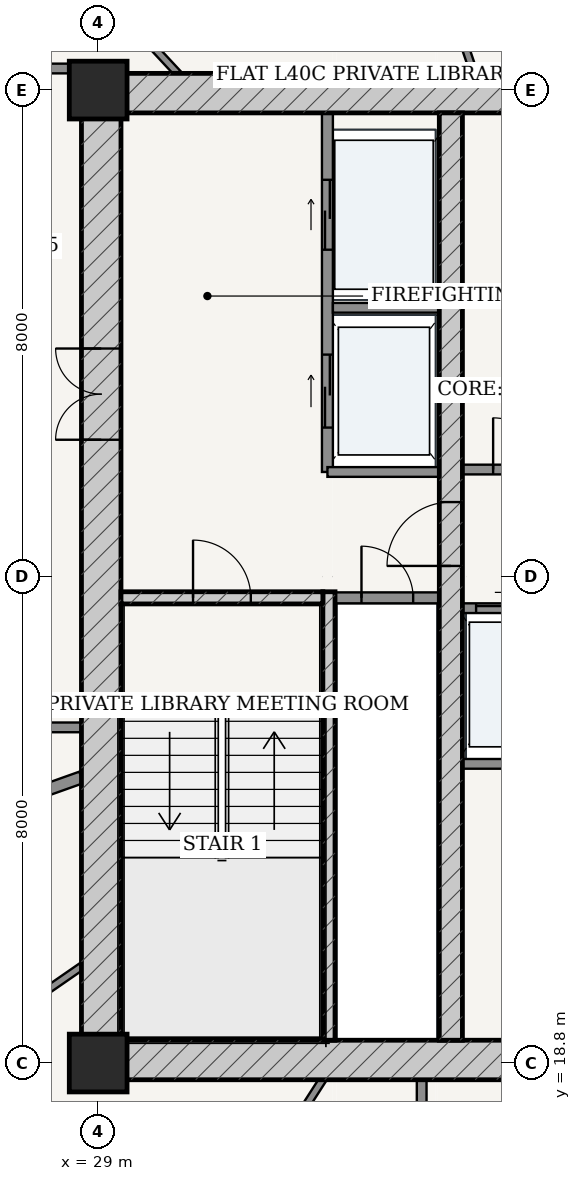
"""IFC4 building model, lengths in metres.
Left out: names, types, materials, properties, quantities, classifications, styles, units other than length and angle.
Written with IfcOpenShell. Run it as: python <this file> out.ifc"""

import sys

from ifc_helpers import new_model, si_unit, direction, frame, frame_2d, origin, origin_2d, place, context, subcontext, project, spatial, rectangle, extrude, source, transform, mapped, element, fill, save


model = new_model("IFC4")
c1 = context("Model", 3, precision=1e-05, world=origin(), true_north=direction((-0.2419218956, 0.970295726276)))
c2 = subcontext(c1, "Body", "Model", "MODEL_VIEW")
j1 = project(units=[si_unit("LENGTHUNIT", "METRE"), si_unit("PLANEANGLEUNIT", "RADIAN")], contexts=[c1])
p1 = place(None, origin())
s1 = spatial("IfcSite", under=j1, at=p1, CompositionType="ELEMENT")
p2 = place(p1, origin())
s2 = spatial("IfcBuilding", under=s1, at=p2, CompositionType="ELEMENT")
p3 = place(p2, frame((0.0, 0.0, 153.4)))
s3 = spatial("IfcBuildingStorey", under=s2, at=p3, CompositionType="ELEMENT", Elevation=153.4)
for number, where, z_axis, x_axis in (
    (1, (29.0, 18.8, 0.0), (0.0, 0.0, 1.0), (1.0, 0.0, 0.0)),
    (2, (29.0, 34.8, 0.0), (0.0, 0.0, 1.0), (1.0, 0.0, 0.0)),
):
    element("IfcColumn", number, at=place(p3, frame(where, z_axis=z_axis, x_axis=x_axis)), inside=s3, PredefinedType="COLUMN", context=c2, shape_type="SweptSolid", body=[
        extrude(rectangle(XDim=0.95, YDim=0.95, at=origin_2d()), origin(), (0.0, 0.0, 1.0), 3.6),
    ])
p4 = place(p3, frame((28.725, 18.85, 0.0), z_axis=(0.0, 0.0, 1.0), x_axis=(1.0, 0.0, 0.0)))
e3 = element("IfcWall", 3, at=p4, inside=s3, PredefinedType="SHEAR", context=c2, shape_type="SweptSolid", body=[
    extrude(rectangle(XDim=18.55, YDim=0.65, at=frame_2d((9.275, 0.0))), origin(), (0.0, 0.0, 1.0), 3.33),
])
p5 = place(p4, frame((7.51, 0.0, 0.0)))
e4 = element("IfcOpeningElement", 4, at=p5, cuts=e3, PredefinedType="OPENING", context=c2, shape_type="SweptSolid", body=[
    extrude(rectangle(XDim=0.85, YDim=2.1, at=frame_2d((0.425, 1.05))), frame((0.0, 0.335, 0.0), z_axis=(0.0, -1.0, 0.0), x_axis=(1.0, 0.0, 0.0)), (0.0, 0.0, 1.0), 0.67),
])
p6 = place(p4, frame((10.59, 0.0, 0.0)))
e5 = element("IfcOpeningElement", 5, at=p6, cuts=e3, PredefinedType="OPENING", context=c2, shape_type="SweptSolid", body=[
    extrude(rectangle(XDim=0.85, YDim=2.1, at=frame_2d((0.425, 1.05))), frame((0.0, 0.335, 0.0), z_axis=(0.0, -1.0, 0.0), x_axis=(1.0, 0.0, 0.0)), (0.0, 0.0, 1.0), 0.67),
])
p7 = place(p3, frame((28.725, 34.75, 0.0), z_axis=(0.0, 0.0, 1.0), x_axis=(1.0, 0.0, 0.0)))
e6 = element("IfcWall", 6, at=p7, inside=s3, PredefinedType="SHEAR", context=c2, shape_type="SweptSolid", body=[
    extrude(rectangle(XDim=18.55, YDim=0.65, at=frame_2d((9.275, 0.0))), origin(), (0.0, 0.0, 1.0), 3.33),
])
p8 = place(p3, frame((29.05, 19.175, 0.0), z_axis=(0.0, 0.0, 1.0), x_axis=(0.0, 1.0, 0.0)))
e7 = element("IfcWall", 7, at=p8, inside=s3, PredefinedType="SHEAR", context=c2, shape_type="SweptSolid", body=[
    extrude(rectangle(XDim=15.25, YDim=0.65, at=frame_2d((7.625, 0.0))), origin(), (0.0, 0.0, 1.0), 3.33),
])
p9 = place(p8, frame((9.875, 0.0, 0.0)))
e8 = element("IfcOpeningElement", 8, at=p9, cuts=e7, PredefinedType="OPENING", context=c2, shape_type="SweptSolid", body=[
    extrude(rectangle(XDim=1.5, YDim=2.2, at=frame_2d((0.75, 1.1))), frame((0.0, 0.335, 0.0), z_axis=(0.0, -1.0, 0.0), x_axis=(1.0, 0.0, 0.0)), (0.0, 0.0, 1.0), 0.67),
])
p10 = place(p3, frame((32.795, 19.175, 0.0), z_axis=(0.0, 0.0, 1.0), x_axis=(0.0, 1.0, 0.0)))
e9 = element("IfcWall", 9, at=p10, inside=s3, PredefinedType="SOLIDWALL", context=c2, shape_type="SweptSolid", body=[
    extrude(rectangle(XDim=7.375, YDim=0.2, at=frame_2d((3.688, 0.0))), origin(), (0.0, 0.0, 1.0), 3.33),
])
p11 = place(p3, frame((29.375, 26.45, 0.0), z_axis=(0.0, 0.0, 1.0), x_axis=(1.0, 0.0, 0.0)))
e10 = element("IfcWall", 10, at=p11, inside=s3, PredefinedType="SOLIDWALL", context=c2, shape_type="SweptSolid", body=[
    extrude(rectangle(XDim=3.32, YDim=0.2, at=frame_2d((1.66, 0.0))), origin(), (0.0, 0.0, 1.0), 3.33),
])
p12 = place(p11, frame((1.185, 0.0, 0.0)))
e11 = element("IfcOpeningElement", 11, at=p12, cuts=e10, PredefinedType="OPENING", context=c2, shape_type="SweptSolid", body=[
    extrude(rectangle(XDim=0.95, YDim=2.15, at=frame_2d((0.475, 1.075))), frame((0.0, 0.11, 0.0), z_axis=(0.0, -1.0, 0.0), x_axis=(1.0, 0.0, 0.0)), (0.0, 0.0, 1.0), 0.22),
])
p13 = place(p3, frame((34.8, 19.175, 0.0), z_axis=(0.0, 0.0, 1.0), x_axis=(0.0, 1.0, 0.0)))
e12 = element("IfcWall", 12, at=p13, inside=s3, PredefinedType="SHEAR", context=c2, shape_type="SweptSolid", body=[
    extrude(rectangle(XDim=15.25, YDim=0.38, at=frame_2d((7.625, 0.0))), origin(), (0.0, 0.0, 1.0), 3.33),
])
p14 = place(p13, frame((7.8, 0.0, 0.0)))
e13 = element("IfcOpeningElement", 13, at=p14, cuts=e12, PredefinedType="OPENING", context=c2, shape_type="SweptSolid", body=[
    extrude(rectangle(XDim=1.05, YDim=2.15, at=frame_2d((0.525, 1.075))), frame((0.0, 0.2, 0.0), z_axis=(0.0, -1.0, 0.0), x_axis=(1.0, 0.0, 0.0)), (0.0, 0.0, 1.0), 0.4),
])
p15 = place(p3, frame((32.9, 26.45, 0.0), z_axis=(0.0, 0.0, 1.0), x_axis=(1.0, 0.0, 0.0)))
e14 = element("IfcWall", 14, at=p15, inside=s3, PredefinedType="PARTITIONING", context=c2, shape_type="SweptSolid", body=[
    extrude(rectangle(XDim=1.71, YDim=0.18, at=frame_2d((0.855, 0.0))), origin(), (0.0, 0.0, 1.0), 3.33),
])
p16 = place(p15, frame((0.43, 0.0, 0.0)))
e15 = element("IfcOpeningElement", 15, at=p16, cuts=e14, PredefinedType="OPENING", context=c2, shape_type="SweptSolid", body=[
    extrude(rectangle(XDim=0.85, YDim=2.1, at=frame_2d((0.425, 1.05))), frame((0.0, 0.1, 0.0), z_axis=(0.0, -1.0, 0.0), x_axis=(1.0, 0.0, 0.0)), (0.0, 0.0, 1.0), 0.2),
])
p17 = place(p3, frame((32.77, 28.52, 0.0), z_axis=(0.0, 0.0, 1.0), x_axis=(0.0, 1.0, 0.0)))
e16 = element("IfcWall", 16, at=p17, inside=s3, PredefinedType="PARTITIONING", context=c2, shape_type="SweptSolid", body=[
    extrude(rectangle(XDim=5.905, YDim=0.18, at=frame_2d((2.953, 0.0))), origin(), (0.0, 0.0, 1.0), 3.33),
])
p18 = place(p17, frame((3.655, 0.0, 0.0)))
e17 = element("IfcOpeningElement", 17, at=p18, cuts=e16, PredefinedType="OPENING", context=c2, shape_type="SweptSolid", body=[
    extrude(rectangle(XDim=1.15, YDim=2.2, at=frame_2d((0.575, 1.1))), frame((0.0, 0.1, 0.0), z_axis=(0.0, -1.0, 0.0), x_axis=(1.0, 0.0, 0.0)), (0.0, 0.0, 1.0), 0.2),
])
p19 = place(p17, frame((0.73, 0.0, 0.0)))
e18 = element("IfcOpeningElement", 18, at=p19, cuts=e16, PredefinedType="OPENING", context=c2, shape_type="SweptSolid", body=[
    extrude(rectangle(XDim=1.2, YDim=2.25, at=frame_2d((0.6, 1.125))), frame((0.0, 0.1, 0.0), z_axis=(0.0, -1.0, 0.0), x_axis=(1.0, 0.0, 0.0)), (0.0, 0.0, 1.0), 0.2),
])
p20 = place(p3, frame((32.86, 31.22, 0.0), z_axis=(0.0, 0.0, 1.0), x_axis=(1.0, 0.0, 0.0)))
e19 = element("IfcWall", 19, at=p20, inside=s3, PredefinedType="PARTITIONING", context=c2, shape_type="SweptSolid", body=[
    extrude(rectangle(XDim=1.75, YDim=0.16, at=frame_2d((0.875, 0.0))), origin(), (0.0, 0.0, 1.0), 3.33),
])
p21 = place(p3, frame((32.77, 28.52, 0.0), z_axis=(0.0, 0.0, 1.0), x_axis=(1.0, 0.0, 0.0)))
e20 = element("IfcWall", 20, at=p21, inside=s3, PredefinedType="PARTITIONING", context=c2, shape_type="SweptSolid", body=[
    extrude(rectangle(XDim=1.84, YDim=0.16, at=frame_2d((0.92, 0.0))), origin(), (0.0, 0.0, 1.0), 3.33),
])
p22 = place(p3, frame((34.99, 28.56, 0.0), z_axis=(0.0, 0.0, 1.0), x_axis=(1.0, 0.0, 0.0)))
e21 = element("IfcWall", 21, at=p22, inside=s3, PredefinedType="PARTITIONING", context=c2, shape_type="SweptSolid", body=[
    extrude(rectangle(XDim=6.02, YDim=0.16, at=frame_2d((3.01, 0.0))), origin(), (0.0, 0.0, 1.0), 3.33),
])
p23 = place(p22, frame((0.505, 0.0, 0.0)))
e22 = element("IfcOpeningElement", 22, at=p23, cuts=e21, PredefinedType="OPENING", context=c2, shape_type="SweptSolid", body=[
    extrude(rectangle(XDim=0.85, YDim=2.1, at=frame_2d((0.425, 1.05))), frame((0.0, 0.09, 0.0), z_axis=(0.0, -1.0, 0.0), x_axis=(1.0, 0.0, 0.0)), (0.0, 0.0, 1.0), 0.18),
])
p24 = place(p22, frame((2.58, 0.0, 0.0)))
e23 = element("IfcOpeningElement", 23, at=p24, cuts=e21, PredefinedType="OPENING", context=c2, shape_type="SweptSolid", body=[
    extrude(rectangle(XDim=0.86, YDim=2.1, at=frame_2d((0.43, 1.05))), frame((0.0, 0.09, 0.0), z_axis=(0.0, -1.0, 0.0), x_axis=(1.0, 0.0, 0.0)), (0.0, 0.0, 1.0), 0.18),
])
p25 = place(p22, frame((4.665, 0.0, 0.0)))
e24 = element("IfcOpeningElement", 24, at=p25, cuts=e21, PredefinedType="OPENING", context=c2, shape_type="SweptSolid", body=[
    extrude(rectangle(XDim=0.85, YDim=2.1, at=frame_2d((0.425, 1.05))), frame((0.0, 0.09, 0.0), z_axis=(0.0, -1.0, 0.0), x_axis=(1.0, 0.0, 0.0)), (0.0, 0.0, 1.0), 0.18),
])
p26 = place(p3, frame((34.99, 26.28, 0.0), z_axis=(0.0, 0.0, 1.0), x_axis=(1.0, 0.0, 0.0)))
e25 = element("IfcWall", 25, at=p26, inside=s3, PredefinedType="PARTITIONING", context=c2, shape_type="SweptSolid", body=[
    extrude(rectangle(XDim=6.02, YDim=0.16, at=frame_2d((3.01, 0.0))), origin(), (0.0, 0.0, 1.0), 3.33),
])
p27 = place(p26, frame((0.225, 0.0, 0.0)))
e26 = element("IfcOpeningElement", 26, at=p27, cuts=e25, PredefinedType="OPENING", context=c2, shape_type="SweptSolid", body=[
    extrude(rectangle(XDim=1.1, YDim=2.2, at=frame_2d((0.55, 1.1))), frame((0.0, 0.09, 0.0), z_axis=(0.0, -1.0, 0.0), x_axis=(1.0, 0.0, 0.0)), (0.0, 0.0, 1.0), 0.18),
])
p28 = place(p26, frame((1.705, 0.0, 0.0)))
e27 = element("IfcOpeningElement", 27, at=p28, cuts=e25, PredefinedType="OPENING", context=c2, shape_type="SweptSolid", body=[
    extrude(rectangle(XDim=1.1, YDim=2.2, at=frame_2d((0.55, 1.1))), frame((0.0, 0.09, 0.0), z_axis=(0.0, -1.0, 0.0), x_axis=(1.0, 0.0, 0.0)), (0.0, 0.0, 1.0), 0.18),
])
p29 = place(p3, frame((34.99, 23.72, 0.0), z_axis=(0.0, 0.0, 1.0), x_axis=(1.0, 0.0, 0.0)))
e28 = element("IfcWall", 28, at=p29, inside=s3, PredefinedType="PARTITIONING", context=c2, shape_type="SweptSolid", body=[
    extrude(rectangle(XDim=6.02, YDim=0.16, at=frame_2d((3.01, 0.0))), origin(), (0.0, 0.0, 1.0), 3.33),
])
p30 = place(p3, frame((26.795, 35.155, 0.0), z_axis=(0.0, 0.0, 1.0), x_axis=(1.0, 0.0, 0.0)))
e29 = element("IfcWall", 29, at=p30, inside=s3, PredefinedType="PARTITIONING", context=c2, shape_type="SweptSolid", body=[
    extrude(rectangle(XDim=1.93, YDim=0.16, at=frame_2d((0.965, 0.0))), origin(), (0.0, 0.0, 1.0), 2.776),
])
p31 = place(p3, frame((26.795, 24.32, 0.0), z_axis=(0.0, 0.0, 1.0), x_axis=(1.0, 0.0, 0.0)))
e30 = element("IfcWall", 30, at=p31, inside=s3, PredefinedType="PARTITIONING", context=c2, shape_type="SweptSolid", body=[
    extrude(rectangle(XDim=1.93, YDim=0.16, at=frame_2d((0.965, 0.0))), origin(), (0.0, 0.0, 1.0), 3.33),
])
p32 = place(p3, frame((34.32, 16.675, 0.0), z_axis=(0.0, 0.0, 1.0), x_axis=(0.0, 1.0, 0.0)))
e31 = element("IfcWall", 31, at=p32, inside=s3, PredefinedType="PARTITIONING", context=c2, shape_type="SweptSolid", body=[
    extrude(rectangle(XDim=1.85, YDim=0.16, at=frame_2d((0.925, 0.0))), origin(), (0.0, 0.0, 1.0), 3.33),
])
p33 = place(p3, frame((35.182, 35.075, 0.0), z_axis=(0.0, 0.0, 1.0), x_axis=(-0.322321614946, 0.946630221649, 0.0)))
e32 = element("IfcWall", 32, at=p33, inside=s3, PredefinedType="PARTITIONING", context=c2, shape_type="SweptSolid", body=[
    extrude(rectangle(XDim=2.737, YDim=0.12, at=frame_2d((1.369, 0.0))), origin(), (0.0, 0.0, 1.0), 2.415),
])
p34 = place(p3, frame((30.307, 35.075, 0.0), z_axis=(0.0, 0.0, 1.0), x_axis=(-0.68082810609, 0.732443233267, 0.0)))
e33 = element("IfcWall", 33, at=p34, inside=s3, PredefinedType="PARTITIONING", context=c2, shape_type="SweptSolid", body=[
    extrude(rectangle(XDim=3.775, YDim=0.12, at=frame_2d((1.887, 0.0))), origin(), (0.0, 0.0, 1.0), 2.776),
])
p35 = place(p3, frame((28.723, 23.497, 0.0), z_axis=(0.0, 0.0, 1.0), x_axis=(-0.942077095572, -0.335396401292, 0.0)))
e34 = element("IfcWall", 34, at=p35, inside=s3, PredefinedType="PARTITIONING", context=c2, shape_type="SweptSolid", body=[
    extrude(rectangle(XDim=13.823, YDim=0.2, at=frame_2d((6.912, 0.0))), origin(), (0.0, 0.0, 1.0), 2.846),
])
p36 = place(p3, frame((28.723, 20.386, 0.0), z_axis=(0.0, 0.0, 1.0), x_axis=(-0.822570551556, -0.568663070467, 0.0)))
e35 = element("IfcWall", 35, at=p36, inside=s3, PredefinedType="PARTITIONING", context=c2, shape_type="SweptSolid", body=[
    extrude(rectangle(XDim=3.158, YDim=0.12, at=frame_2d((1.579, 0.0))), origin(), (0.0, 0.0, 1.0), 3.33),
])
p37 = place(p3, frame((32.691, 18.525, 0.0), z_axis=(0.0, 0.0, 1.0), x_axis=(-0.54002976428, -0.841645919429, 0.0)))
e36 = element("IfcWall", 36, at=p37, inside=s3, PredefinedType="PARTITIONING", context=c2, shape_type="SweptSolid", body=[
    extrude(rectangle(XDim=3.086, YDim=0.12, at=frame_2d((1.543, 0.0))), origin(), (0.0, 0.0, 1.0), 3.33),
])
m1 = source(origin(), c2, "Body", "SweptSolid", [
    extrude(rectangle(XDim=1.5, YDim=2.2, at=frame_2d((0.75, 1.1))), frame((0.0, 0.025, 0.0), z_axis=(0.0, -1.0, 0.0), x_axis=(1.0, 0.0, 0.0)), (0.0, 0.0, 1.0), 0.05),
])
p38 = place(p9, origin())
e37 = element("IfcDoor", 37, at=p38, inside=s3, OperationType="DOUBLE_DOOR_SINGLE_SWING", PredefinedType="DOOR", context=c2, shape_type="MappedRepresentation", body=[
    mapped(m1, transform((0.0, 0.0, 0.0), scale=1.0)),
])
fill(e8, e37)
m2 = source(origin(), c2, "Body", "SweptSolid", [
    extrude(rectangle(XDim=1.05, YDim=2.15, at=frame_2d((0.525, 1.075))), frame((0.0, 0.025, 0.0), z_axis=(0.0, -1.0, 0.0), x_axis=(1.0, 0.0, 0.0)), (0.0, 0.0, 1.0), 0.05),
])
p39 = place(p14, origin())
e38 = element("IfcDoor", 38, at=p39, inside=s3, OperationType="SINGLE_SWING_LEFT", PredefinedType="DOOR", context=c2, shape_type="MappedRepresentation", body=[
    mapped(m2, transform((0.0, 0.0, 0.0), scale=1.0)),
])
fill(e13, e38)
m3 = source(origin(), c2, "Body", "SweptSolid", [
    extrude(rectangle(XDim=0.95, YDim=2.15, at=frame_2d((0.475, 1.075))), frame((0.0, 0.025, 0.0), z_axis=(0.0, -1.0, 0.0), x_axis=(1.0, 0.0, 0.0)), (0.0, 0.0, 1.0), 0.05),
])
p40 = place(p12, origin())
e39 = element("IfcDoor", 39, at=p40, inside=s3, OperationType="SINGLE_SWING_LEFT", PredefinedType="DOOR", context=c2, shape_type="MappedRepresentation", body=[
    mapped(m3, transform((0.0, 0.0, 0.0), scale=1.0)),
])
fill(e11, e39)
m4 = source(origin(), c2, "Body", "SweptSolid", [
    extrude(rectangle(XDim=0.85, YDim=2.1, at=frame_2d((0.425, 1.05))), frame((0.0, 0.025, 0.0), z_axis=(0.0, -1.0, 0.0), x_axis=(1.0, 0.0, 0.0)), (0.0, 0.0, 1.0), 0.05),
])
p41 = place(p16, origin())
e40 = element("IfcDoor", 40, at=p41, inside=s3, OperationType="SINGLE_SWING_LEFT", PredefinedType="DOOR", context=c2, shape_type="MappedRepresentation", body=[
    mapped(m4, transform((0.0, 0.0, 0.0), scale=1.0)),
])
fill(e15, e40)
p42 = place(p23, origin())
e41 = element("IfcDoor", 41, at=p42, inside=s3, OperationType="SINGLE_SWING_LEFT", PredefinedType="DOOR", context=c2, shape_type="MappedRepresentation", body=[
    mapped(m4, transform((0.0, 0.0, 0.0), scale=1.0)),
])
fill(e22, e41)
m5 = source(origin(), c2, "Body", "SweptSolid", [
    extrude(rectangle(XDim=1.15, YDim=2.2, at=frame_2d((0.575, 1.1))), frame((0.0, 0.025, 0.0), z_axis=(0.0, -1.0, 0.0), x_axis=(1.0, 0.0, 0.0)), (0.0, 0.0, 1.0), 0.05),
])
p43 = place(p18, origin())
e42 = element("IfcDoor", 42, at=p43, inside=s3, OperationType="DOUBLE_DOOR_SLIDING", PredefinedType="DOOR", context=c2, shape_type="MappedRepresentation", body=[
    mapped(m5, transform((0.0, 0.0, 0.0), scale=1.0)),
])
fill(e17, e42)
m6 = source(origin(), c2, "Body", "SweptSolid", [
    extrude(rectangle(XDim=1.2, YDim=2.25, at=frame_2d((0.6, 1.125))), frame((0.0, 0.025, 0.0), z_axis=(0.0, -1.0, 0.0), x_axis=(1.0, 0.0, 0.0)), (0.0, 0.0, 1.0), 0.05),
])
p44 = place(p19, origin())
e43 = element("IfcDoor", 43, at=p44, inside=s3, OperationType="DOUBLE_DOOR_SLIDING", PredefinedType="DOOR", context=c2, shape_type="MappedRepresentation", body=[
    mapped(m6, transform((0.0, 0.0, 0.0), scale=1.0)),
])
fill(e18, e43)
m7 = source(origin(), c2, "Body", "SweptSolid", [
    extrude(rectangle(XDim=1.1, YDim=2.2, at=frame_2d((0.55, 1.1))), frame((0.0, 0.025, 0.0), z_axis=(0.0, -1.0, 0.0), x_axis=(1.0, 0.0, 0.0)), (0.0, 0.0, 1.0), 0.05),
])
p45 = place(p27, origin())
e44 = element("IfcDoor", 44, at=p45, inside=s3, OperationType="DOUBLE_DOOR_SLIDING", PredefinedType="DOOR", context=c2, shape_type="MappedRepresentation", body=[
    mapped(m7, transform((0.0, 0.0, 0.0), scale=1.0)),
])
fill(e26, e44)
save(model, sys.argv[1])
